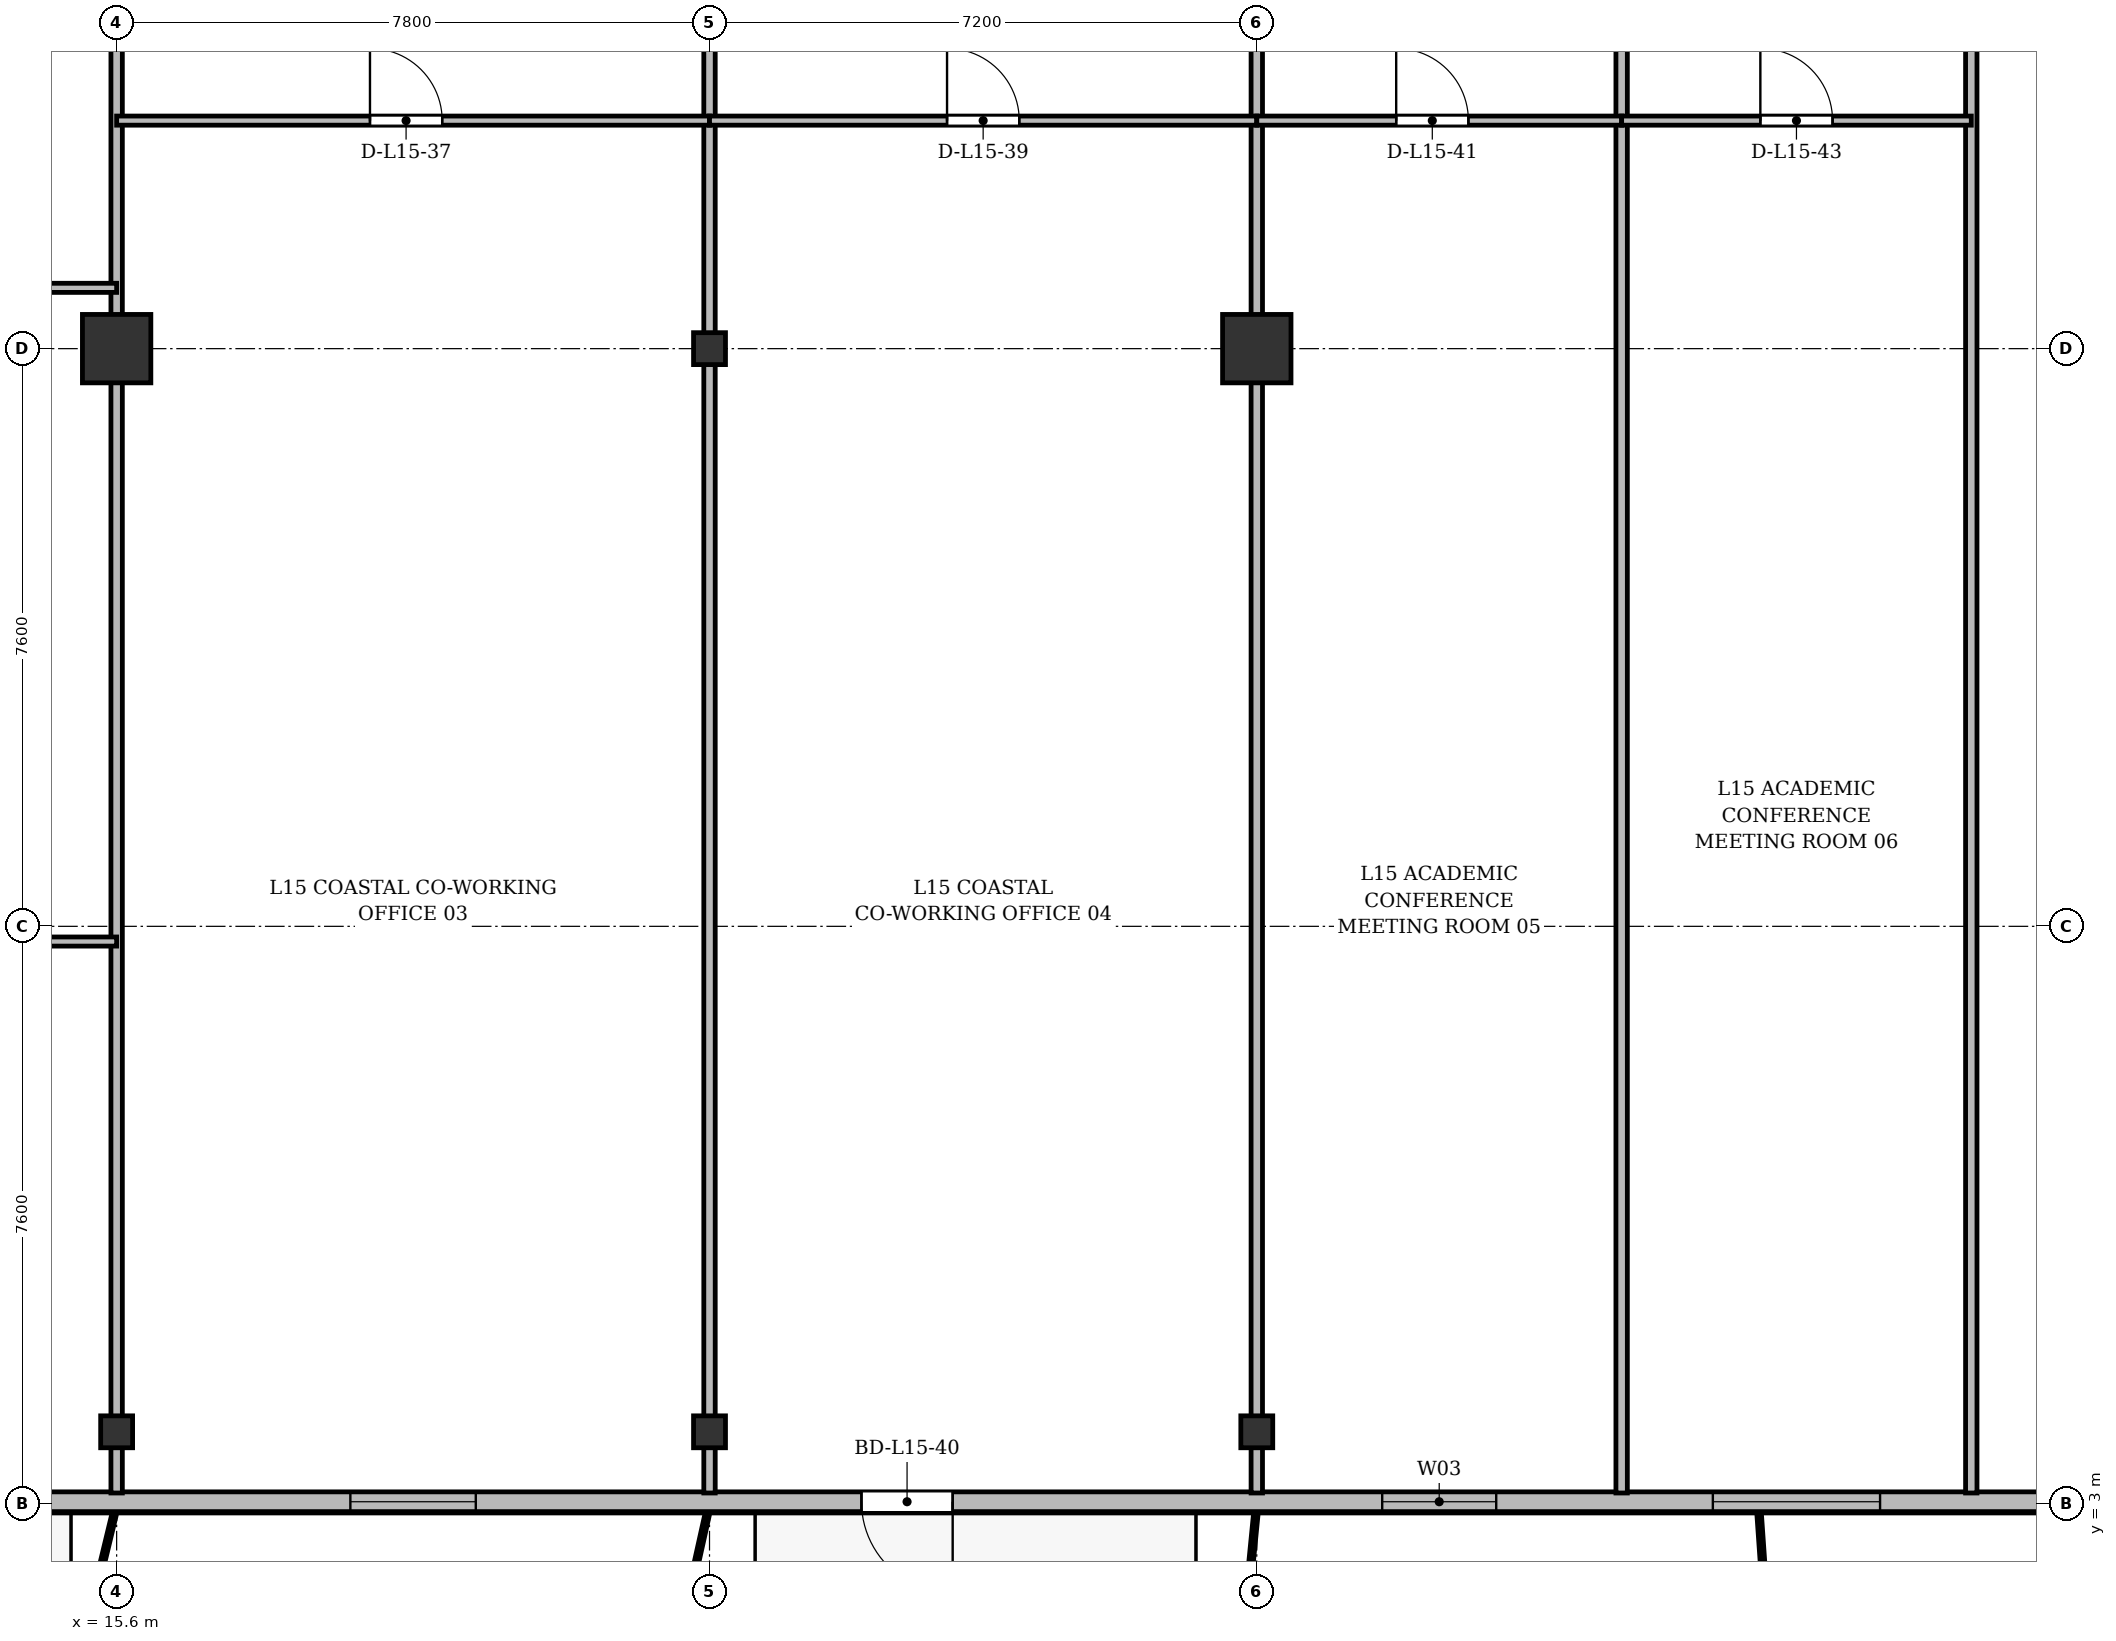
"""IFC4 building model, lengths in metres.
Left out: names, types, materials, properties, quantities, classifications, styles, units other than length and angle.
Written with IfcOpenShell. Run it as: python <this file> out.ifc"""

import sys

from ifc_helpers import new_model, si_unit, direction, frame, frame_2d, origin, origin_2d, place, context, subcontext, project, spatial, rectangle, i_section, extrude, source, transform, mapped, element, fill, save


model = new_model("IFC4")
c1 = context("Model", 3, precision=1e-05, world=origin(), true_north=direction((0.0, 1.0)))
c2 = subcontext(c1, "Body", "Model", "MODEL_VIEW")
j1 = project(units=[si_unit("LENGTHUNIT", "METRE"), si_unit("PLANEANGLEUNIT", "RADIAN")], contexts=[c1])
p1 = place(None, origin())
s1 = spatial("IfcSite", under=j1, at=p1, CompositionType="ELEMENT")
p2 = place(p1, origin())
s2 = spatial("IfcBuilding", under=s1, at=p2, CompositionType="ELEMENT")
p3 = place(p2, frame((0.0, 0.0, 59.5)))
s3 = spatial("IfcBuildingStorey", under=s2, at=p3, CompositionType="ELEMENT", Elevation=59.5)
m1 = source(origin(), c2, "Body", "SweptSolid", [
    extrude(i_section(OverallWidth=0.42, OverallDepth=0.42, WebThickness=0.026, FlangeThickness=0.04, at=origin_2d()), origin(), (0.0, 0.0, 1.0), 3.6),
])
p4 = place(p3, frame((15.6, 3.95, 0.0), z_axis=(0.0, 0.0, 1.0), x_axis=(1.0, 0.0, 0.0)))
e1 = element("IfcColumn", 1, at=p4, inside=s3, PredefinedType="COLUMN", context=c2, shape_type="MappedRepresentation", body=[
    mapped(m1, transform((0.0, 0.0, 0.0), x_axis=(1.0, 0.0, 0.0), y_axis=(0.0, 1.0, 0.0), z_axis=(0.0, 0.0, 1.0), scale=1.0)),
])
m2 = source(origin(), c2, "Body", "SweptSolid", [
    extrude(rectangle(XDim=0.9, YDim=0.9, at=origin_2d()), origin(), (0.0, 0.0, 1.0), 3.6),
])
p5 = place(p3, frame((15.6, 18.2, 0.0), z_axis=(0.0, 0.0, 1.0), x_axis=(1.0, 0.0, 0.0)))
e2 = element("IfcColumn", 2, at=p5, inside=s3, PredefinedType="COLUMN", context=c2, shape_type="MappedRepresentation", body=[
    mapped(m2, transform((0.0, 0.0, 0.0), x_axis=(1.0, 0.0, 0.0), y_axis=(0.0, 1.0, 0.0), z_axis=(0.0, 0.0, 1.0), scale=1.0)),
])
for number, where, z_axis, x_axis in (
    (3, (23.4, 3.95, 0.0), (0.0, 0.0, 1.0), (1.0, 0.0, 0.0)),
    (4, (23.4, 18.2, 0.0), (0.0, 0.0, 1.0), (1.0, 0.0, 0.0)),
    (5, (30.6, 3.95, 0.0), (0.0, 0.0, 1.0), (1.0, 0.0, 0.0)),
):
    element("IfcColumn", number, at=place(p3, frame(where, z_axis=z_axis, x_axis=x_axis)), inside=s3, PredefinedType="COLUMN", context=c2, shape_type="MappedRepresentation", body=[
        mapped(m1, transform((0.0, 0.0, 0.0), x_axis=(1.0, 0.0, 0.0), y_axis=(0.0, 1.0, 0.0), z_axis=(0.0, 0.0, 1.0), scale=1.0)),
    ])
p6 = place(p3, frame((30.6, 18.2, 0.0), z_axis=(0.0, 0.0, 1.0), x_axis=(1.0, 0.0, 0.0)))
e6 = element("IfcColumn", 6, at=p6, inside=s3, PredefinedType="COLUMN", context=c2, shape_type="MappedRepresentation", body=[
    mapped(m2, transform((0.0, 0.0, 0.0), x_axis=(1.0, 0.0, 0.0), y_axis=(0.0, 1.0, 0.0), z_axis=(0.0, 0.0, 1.0), scale=1.0)),
])
p7 = place(p3, frame((66.9, 3.03, 0.0), z_axis=(0.0, 0.0, 1.0), x_axis=(-1.0, 0.0, 0.0)))
e7 = element("IfcWall", 7, at=p7, inside=s3, PredefinedType="SOLIDWALL", context=c2, shape_type="SweptSolid", body=[
    extrude(rectangle(XDim=59.4, YDim=0.26, at=frame_2d((29.7, 0.0))), origin(), (0.0, 0.0, 1.0), 3.34),
])
p8 = place(p7, frame((3.6, 0.0, 0.9)))
e8 = element("IfcOpeningElement", 8, at=p8, cuts=e7, PredefinedType="OPENING", context=c2, shape_type="SweptSolid", body=[
    extrude(rectangle(XDim=2.2, YDim=1.8, at=frame_2d((1.1, 0.9))), frame((0.0, 0.14, 0.0), z_axis=(0.0, -1.0, 0.0), x_axis=(1.0, 0.0, 0.0)), (0.0, 0.0, 1.0), 0.28),
])
p9 = place(p7, frame((9.18, 0.0, 0.0)))
e9 = element("IfcOpeningElement", 9, at=p9, cuts=e7, PredefinedType="OPENING", context=c2, shape_type="SweptSolid", body=[
    extrude(rectangle(XDim=1.2, YDim=2.2, at=frame_2d((0.6, 1.1))), frame((0.0, 0.14, 0.0), z_axis=(0.0, -1.0, 0.0), x_axis=(1.0, 0.0, 0.0)), (0.0, 0.0, 1.0), 0.28),
])
p10 = place(p7, frame((12.95, 0.0, 0.9)))
e10 = element("IfcOpeningElement", 10, at=p10, cuts=e7, PredefinedType="OPENING", context=c2, shape_type="SweptSolid", body=[
    extrude(rectangle(XDim=2.0, YDim=1.95, at=frame_2d((1.0, 0.975))), frame((0.0, 0.14, 0.0), z_axis=(0.0, -1.0, 0.0), x_axis=(1.0, 0.0, 0.0)), (0.0, 0.0, 1.0), 0.28),
])
p11 = place(p7, frame((18.675, 0.0, 0.9)))
e11 = element("IfcOpeningElement", 11, at=p11, cuts=e7, PredefinedType="OPENING", context=c2, shape_type="SweptSolid", body=[
    extrude(rectangle(XDim=1.65, YDim=1.85, at=frame_2d((0.825, 0.925))), frame((0.0, 0.14, 0.0), z_axis=(0.0, -1.0, 0.0), x_axis=(1.0, 0.0, 0.0)), (0.0, 0.0, 1.0), 0.28),
])
p12 = place(p7, frame((24.1, 0.0, 0.9)))
e12 = element("IfcOpeningElement", 12, at=p12, cuts=e7, PredefinedType="OPENING", context=c2, shape_type="SweptSolid", body=[
    extrude(rectangle(XDim=1.8, YDim=1.8, at=frame_2d((0.9, 0.9))), frame((0.0, 0.14, 0.0), z_axis=(0.0, -1.0, 0.0), x_axis=(1.0, 0.0, 0.0)), (0.0, 0.0, 1.0), 0.28),
])
p13 = place(p7, frame((28.1, 0.0, 0.9)))
e13 = element("IfcOpeningElement", 13, at=p13, cuts=e7, PredefinedType="OPENING", context=c2, shape_type="SweptSolid", body=[
    extrude(rectangle(XDim=2.2, YDim=1.8, at=frame_2d((1.1, 0.9))), frame((0.0, 0.14, 0.0), z_axis=(0.0, -1.0, 0.0), x_axis=(1.0, 0.0, 0.0)), (0.0, 0.0, 1.0), 0.28),
])
p14 = place(p7, frame((33.15, 0.0, 0.9)))
e14 = element("IfcOpeningElement", 14, at=p14, cuts=e7, PredefinedType="OPENING", context=c2, shape_type="SweptSolid", body=[
    extrude(rectangle(XDim=1.5, YDim=1.75, at=frame_2d((0.75, 0.875))), frame((0.0, 0.14, 0.0), z_axis=(0.0, -1.0, 0.0), x_axis=(1.0, 0.0, 0.0)), (0.0, 0.0, 1.0), 0.28),
])
p15 = place(p7, frame((40.301, 0.0, 0.0)))
e15 = element("IfcOpeningElement", 15, at=p15, cuts=e7, PredefinedType="OPENING", context=c2, shape_type="SweptSolid", body=[
    extrude(rectangle(XDim=1.2, YDim=2.2, at=frame_2d((0.6, 1.1))), frame((0.0, 0.14, 0.0), z_axis=(0.0, -1.0, 0.0), x_axis=(1.0, 0.0, 0.0)), (0.0, 0.0, 1.0), 0.28),
])
p16 = place(p7, frame((46.575, 0.0, 0.9)))
e16 = element("IfcOpeningElement", 16, at=p16, cuts=e7, PredefinedType="OPENING", context=c2, shape_type="SweptSolid", body=[
    extrude(rectangle(XDim=1.65, YDim=1.85, at=frame_2d((0.825, 0.925))), frame((0.0, 0.14, 0.0), z_axis=(0.0, -1.0, 0.0), x_axis=(1.0, 0.0, 0.0)), (0.0, 0.0, 1.0), 0.28),
])
p17 = place(p7, frame((53.136, 0.0, 0.0)))
e17 = element("IfcOpeningElement", 17, at=p17, cuts=e7, PredefinedType="OPENING", context=c2, shape_type="SweptSolid", body=[
    extrude(rectangle(XDim=1.2, YDim=2.2, at=frame_2d((0.6, 1.1))), frame((0.0, 0.14, 0.0), z_axis=(0.0, -1.0, 0.0), x_axis=(1.0, 0.0, 0.0)), (0.0, 0.0, 1.0), 0.28),
])
p18 = place(p7, frame((55.3, 0.0, 0.9)))
e18 = element("IfcOpeningElement", 18, at=p18, cuts=e7, PredefinedType="OPENING", context=c2, shape_type="SweptSolid", body=[
    extrude(rectangle(XDim=2.2, YDim=1.8, at=frame_2d((1.1, 0.9))), frame((0.0, 0.14, 0.0), z_axis=(0.0, -1.0, 0.0), x_axis=(1.0, 0.0, 0.0)), (0.0, 0.0, 1.0), 0.28),
])
for number, where, z_axis, x_axis in (
    (19, (15.6, 3.145, 0.0), (0.0, 0.0, 1.0), (0.0, 1.0, 0.0)),
    (20, (23.4, 3.145, 0.0), (0.0, 0.0, 1.0), (0.0, 1.0, 0.0)),
    (21, (30.6, 3.145, 0.0), (0.0, 0.0, 1.0), (0.0, 1.0, 0.0)),
):
    element("IfcWall", number, at=place(p3, frame(where, z_axis=z_axis, x_axis=x_axis)), inside=s3, PredefinedType="PARTITIONING", context=c2, shape_type="SweptSolid", body=[
        extrude(rectangle(XDim=24.455, YDim=0.15, at=frame_2d((12.228, 0.0))), origin(), (0.0, 0.0, 1.0), 2.752),
    ])
for number, where, z_axis, x_axis in (
    (22, (35.4, 3.145, 0.0), (0.0, 0.0, 1.0), (0.0, 1.0, 0.0)),
    (23, (40.0, 3.145, 0.0), (0.0, 0.0, 1.0), (0.0, 1.0, 0.0)),
):
    element("IfcWall", number, at=place(p3, frame(where, z_axis=z_axis, x_axis=x_axis)), inside=s3, PredefinedType="PARTITIONING", context=c2, shape_type="SweptSolid", body=[
        extrude(rectangle(XDim=24.455, YDim=0.15, at=frame_2d((12.228, 0.0))), origin(), (0.0, 0.0, 1.0), 2.69),
    ])
p19 = place(p3, frame((8.8, 19.0, 0.0), z_axis=(0.0, 0.0, 1.0), x_axis=(1.0, 0.0, 0.0)))
e24 = element("IfcWall", 24, at=p19, inside=s3, PredefinedType="PARTITIONING", context=c2, shape_type="SweptSolid", body=[
    extrude(rectangle(XDim=6.8, YDim=0.12, at=frame_2d((3.4, 0.0))), origin(), (0.0, 0.0, 1.0), 2.752),
])
p20 = place(p19, frame((2.925, 0.0, 0.0)))
e25 = element("IfcOpeningElement", 25, at=p20, cuts=e24, PredefinedType="OPENING", context=c2, shape_type="SweptSolid", body=[
    extrude(rectangle(XDim=0.95, YDim=2.15, at=frame_2d((0.475, 1.075))), frame((0.0, 0.07, 0.0), z_axis=(0.0, -1.0, 0.0), x_axis=(1.0, 0.0, 0.0)), (0.0, 0.0, 1.0), 0.14),
])
p21 = place(p3, frame((12.2, 10.4, 0.0), z_axis=(0.0, 0.0, 1.0), x_axis=(1.0, 0.0, 0.0)))
e26 = element("IfcWall", 26, at=p21, inside=s3, PredefinedType="PARTITIONING", context=c2, shape_type="SweptSolid", body=[
    extrude(rectangle(XDim=3.4, YDim=0.12, at=frame_2d((1.7, 0.0))), origin(), (0.0, 0.0, 1.0), 2.752),
])
p22 = place(p21, frame((1.131, 0.0, 0.0)))
e27 = element("IfcOpeningElement", 27, at=p22, cuts=e26, PredefinedType="OPENING", context=c2, shape_type="SweptSolid", body=[
    extrude(rectangle(XDim=0.95, YDim=2.15, at=frame_2d((0.475, 1.075))), frame((0.0, 0.07, 0.0), z_axis=(0.0, -1.0, 0.0), x_axis=(1.0, 0.0, 0.0)), (0.0, 0.0, 1.0), 0.14),
])
p23 = place(p3, frame((15.6, 21.2, 0.0), z_axis=(0.0, 0.0, 1.0), x_axis=(1.0, 0.0, 0.0)))
e28 = element("IfcWall", 28, at=p23, inside=s3, PredefinedType="PARTITIONING", context=c2, shape_type="SweptSolid", body=[
    extrude(rectangle(XDim=7.8, YDim=0.12, at=frame_2d((3.9, 0.0))), origin(), (0.0, 0.0, 1.0), 2.752),
])
p24 = place(p23, frame((3.333, 0.0, 0.0)))
e29 = element("IfcOpeningElement", 29, at=p24, cuts=e28, PredefinedType="OPENING", context=c2, shape_type="SweptSolid", body=[
    extrude(rectangle(XDim=0.95, YDim=2.15, at=frame_2d((0.475, 1.075))), frame((0.0, 0.07, 0.0), z_axis=(0.0, -1.0, 0.0), x_axis=(1.0, 0.0, 0.0)), (0.0, 0.0, 1.0), 0.14),
])
p25 = place(p3, frame((23.4, 21.2, 0.0), z_axis=(0.0, 0.0, 1.0), x_axis=(1.0, 0.0, 0.0)))
e30 = element("IfcWall", 30, at=p25, inside=s3, PredefinedType="PARTITIONING", context=c2, shape_type="SweptSolid", body=[
    extrude(rectangle(XDim=7.2, YDim=0.12, at=frame_2d((3.6, 0.0))), origin(), (0.0, 0.0, 1.0), 2.752),
])
p26 = place(p25, frame((3.125, 0.0, 0.0)))
e31 = element("IfcOpeningElement", 31, at=p26, cuts=e30, PredefinedType="OPENING", context=c2, shape_type="SweptSolid", body=[
    extrude(rectangle(XDim=0.95, YDim=2.15, at=frame_2d((0.475, 1.075))), frame((0.0, 0.07, 0.0), z_axis=(0.0, -1.0, 0.0), x_axis=(1.0, 0.0, 0.0)), (0.0, 0.0, 1.0), 0.14),
])
p27 = place(p3, frame((30.6, 21.2, 0.0), z_axis=(0.0, 0.0, 1.0), x_axis=(1.0, 0.0, 0.0)))
e32 = element("IfcWall", 32, at=p27, inside=s3, PredefinedType="PARTITIONING", context=c2, shape_type="SweptSolid", body=[
    extrude(rectangle(XDim=4.8, YDim=0.12, at=frame_2d((2.4, 0.0))), origin(), (0.0, 0.0, 1.0), 2.752),
])
p28 = place(p27, frame((1.834, 0.0, 0.0)))
e33 = element("IfcOpeningElement", 33, at=p28, cuts=e32, PredefinedType="OPENING", context=c2, shape_type="SweptSolid", body=[
    extrude(rectangle(XDim=0.95, YDim=2.15, at=frame_2d((0.475, 1.075))), frame((0.0, 0.07, 0.0), z_axis=(0.0, -1.0, 0.0), x_axis=(1.0, 0.0, 0.0)), (0.0, 0.0, 1.0), 0.14),
])
p29 = place(p3, frame((35.4, 21.2, 0.0), z_axis=(0.0, 0.0, 1.0), x_axis=(1.0, 0.0, 0.0)))
e34 = element("IfcWall", 34, at=p29, inside=s3, PredefinedType="PARTITIONING", context=c2, shape_type="SweptSolid", body=[
    extrude(rectangle(XDim=4.6, YDim=0.12, at=frame_2d((2.3, 0.0))), origin(), (0.0, 0.0, 1.0), 3.34),
])
p30 = place(p29, frame((1.825, 0.0, 0.0)))
e35 = element("IfcOpeningElement", 35, at=p30, cuts=e34, PredefinedType="OPENING", context=c2, shape_type="SweptSolid", body=[
    extrude(rectangle(XDim=0.95, YDim=2.15, at=frame_2d((0.475, 1.075))), frame((0.0, 0.07, 0.0), z_axis=(0.0, -1.0, 0.0), x_axis=(1.0, 0.0, 0.0)), (0.0, 0.0, 1.0), 0.14),
])
m3 = source(origin(), c2, "Body", "SweptSolid", [
    extrude(rectangle(XDim=2.2, YDim=1.8, at=frame_2d((1.1, 0.9))), frame((0.0, 0.03, 0.0), z_axis=(0.0, -1.0, 0.0), x_axis=(1.0, 0.0, 0.0)), (0.0, 0.0, 1.0), 0.06),
])
p31 = place(p13, origin())
e36 = element("IfcWindow", 36, at=p31, inside=s3, PartitioningType="SINGLE_PANEL", PredefinedType="WINDOW", context=c2, shape_type="MappedRepresentation", body=[
    mapped(m3, transform((0.0, 0.0, 0.0), x_axis=(1.0, 0.0, 0.0), y_axis=(0.0, 1.0, 0.0), z_axis=(0.0, 0.0, 1.0), scale=1.0)),
])
fill(e13, e36)
m4 = source(origin(), c2, "Body", "SweptSolid", [
    extrude(rectangle(XDim=1.5, YDim=1.75, at=frame_2d((0.75, 0.875))), frame((0.0, 0.03, 0.0), z_axis=(0.0, -1.0, 0.0), x_axis=(1.0, 0.0, 0.0)), (0.0, 0.0, 1.0), 0.06),
])
p32 = place(p14, origin())
e37 = element("IfcWindow", 37, at=p32, inside=s3, PartitioningType="SINGLE_PANEL", PredefinedType="WINDOW", context=c2, shape_type="MappedRepresentation", body=[
    mapped(m4, transform((0.0, 0.0, 0.0), x_axis=(1.0, 0.0, 0.0), y_axis=(0.0, 1.0, 0.0), z_axis=(0.0, 0.0, 1.0), scale=1.0)),
])
fill(e14, e37)
m5 = source(origin(), c2, "Body", "SweptSolid", [
    extrude(rectangle(XDim=1.2, YDim=2.2, at=frame_2d((0.6, 1.1))), frame((0.0, 0.025, 0.0), z_axis=(0.0, -1.0, 0.0), x_axis=(1.0, 0.0, 0.0)), (0.0, 0.0, 1.0), 0.05),
])
p33 = place(p15, origin())
e38 = element("IfcDoor", 38, at=p33, inside=s3, OperationType="SINGLE_SWING_LEFT", PredefinedType="DOOR", context=c2, shape_type="MappedRepresentation", body=[
    mapped(m5, transform((0.0, 0.0, 0.0), x_axis=(1.0, 0.0, 0.0), y_axis=(0.0, 1.0, 0.0), z_axis=(0.0, 0.0, 1.0), scale=1.0)),
])
fill(e15, e38)
m6 = source(origin(), c2, "Body", "SweptSolid", [
    extrude(rectangle(XDim=1.65, YDim=1.85, at=frame_2d((0.825, 0.925))), frame((0.0, 0.03, 0.0), z_axis=(0.0, -1.0, 0.0), x_axis=(1.0, 0.0, 0.0)), (0.0, 0.0, 1.0), 0.06),
])
p34 = place(p16, origin())
e39 = element("IfcWindow", 39, at=p34, inside=s3, PartitioningType="SINGLE_PANEL", PredefinedType="WINDOW", context=c2, shape_type="MappedRepresentation", body=[
    mapped(m6, transform((0.0, 0.0, 0.0), x_axis=(1.0, 0.0, 0.0), y_axis=(0.0, 1.0, 0.0), z_axis=(0.0, 0.0, 1.0), scale=1.0)),
])
fill(e16, e39)
m7 = source(origin(), c2, "Body", "SweptSolid", [
    extrude(rectangle(XDim=0.95, YDim=2.15, at=frame_2d((0.475, 1.075))), frame((0.0, 0.025, 0.0), z_axis=(0.0, -1.0, 0.0), x_axis=(1.0, 0.0, 0.0)), (0.0, 0.0, 1.0), 0.05),
])
p35 = place(p24, origin())
e40 = element("IfcDoor", 40, at=p35, inside=s3, OperationType="SINGLE_SWING_LEFT", PredefinedType="DOOR", context=c2, shape_type="MappedRepresentation", body=[
    mapped(m7, transform((0.0, 0.0, 0.0), x_axis=(1.0, 0.0, 0.0), y_axis=(0.0, 1.0, 0.0), z_axis=(0.0, 0.0, 1.0), scale=1.0)),
])
fill(e29, e40)
p36 = place(p26, origin())
e41 = element("IfcDoor", 41, at=p36, inside=s3, OperationType="SINGLE_SWING_LEFT", PredefinedType="DOOR", context=c2, shape_type="MappedRepresentation", body=[
    mapped(m7, transform((0.0, 0.0, 0.0), x_axis=(1.0, 0.0, 0.0), y_axis=(0.0, 1.0, 0.0), z_axis=(0.0, 0.0, 1.0), scale=1.0)),
])
fill(e31, e41)
p37 = place(p28, origin())
e42 = element("IfcDoor", 42, at=p37, inside=s3, OperationType="SINGLE_SWING_LEFT", PredefinedType="DOOR", context=c2, shape_type="MappedRepresentation", body=[
    mapped(m7, transform((0.0, 0.0, 0.0), x_axis=(1.0, 0.0, 0.0), y_axis=(0.0, 1.0, 0.0), z_axis=(0.0, 0.0, 1.0), scale=1.0)),
])
fill(e33, e42)
p38 = place(p30, origin())
e43 = element("IfcDoor", 43, at=p38, inside=s3, OperationType="SINGLE_SWING_LEFT", PredefinedType="DOOR", context=c2, shape_type="MappedRepresentation", body=[
    mapped(m7, transform((0.0, 0.0, 0.0), x_axis=(1.0, 0.0, 0.0), y_axis=(0.0, 1.0, 0.0), z_axis=(0.0, 0.0, 1.0), scale=1.0)),
])
fill(e35, e43)
save(model, sys.argv[1])
